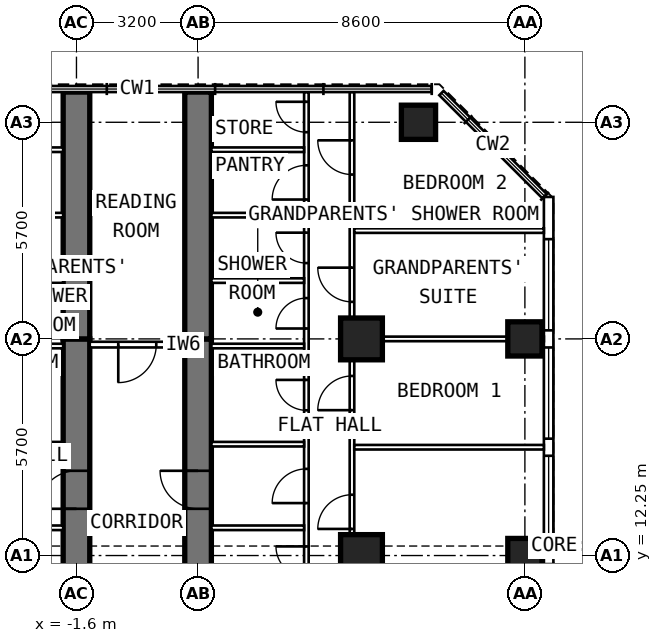
"""IFC4 building model, lengths in metres.
Left out: names, types, materials, properties, quantities, classifications, styles, units other than length and angle.
Written with IfcOpenShell. Run it as: python <this file> out.ifc"""

import sys

from ifc_helpers import new_model, si_unit, direction, frame, frame_2d, origin, origin_2d, place, context, subcontext, project, spatial, rectangle, extrude, element, fill, save


model = new_model("IFC4")
c1 = context("Model", 3, precision=1e-05, world=origin(), true_north=direction((0.0, 1.0)))
c2 = subcontext(c1, "Body", "Model", "MODEL_VIEW")
j1 = project(units=[si_unit("LENGTHUNIT", "METRE"), si_unit("PLANEANGLEUNIT", "RADIAN")], contexts=[c1])
p1 = place(None, origin())
s1 = spatial("IfcSite", under=j1, at=p1, CompositionType="ELEMENT")
p2 = place(p1, origin())
s2 = spatial("IfcBuilding", under=s1, at=p2, CompositionType="ELEMENT")
p3 = place(p2, frame((0.0, 0.0, 211.8)))
s3 = spatial("IfcBuildingStorey", under=s2, at=p3, CompositionType="ELEMENT", Elevation=211.8)
for number, where, z_axis, x_axis in (
    (1, (10.2, 12.25, 0.0), (0.0, 0.0, 1.0), (0.0, 1.0, 0.0)),
    (2, (10.2, 17.95, 0.0), (0.0, 0.0, 1.0), (0.0, 1.0, 0.0)),
    (3, (7.4, 23.65, 0.0), (0.0, 0.0, 1.0), (0.0, 1.0, 0.0)),
):
    element("IfcColumn", number, at=place(p3, frame(where, z_axis=z_axis, x_axis=x_axis)), inside=s3, PredefinedType="COLUMN", context=c2, shape_type="SweptSolid", body=[
        extrude(rectangle(XDim=0.9, YDim=0.9, at=origin_2d()), origin(), (0.0, 0.0, 1.0), 3.6),
    ])
for number, where, z_axis, x_axis in (
    (4, (5.9, 12.25, 0.0), (0.0, 0.0, 1.0), (0.0, 1.0, 0.0)),
    (5, (5.9, 17.95, 0.0), (0.0, 0.0, 1.0), (0.0, 1.0, 0.0)),
):
    element("IfcColumn", number, at=place(p3, frame(where, z_axis=z_axis, x_axis=x_axis)), inside=s3, PredefinedType="COLUMN", context=c2, shape_type="SweptSolid", body=[
        extrude(rectangle(XDim=1.1, YDim=1.1, at=origin_2d()), origin(), (0.0, 0.0, 1.0), 3.6),
    ])
p4 = place(p3, frame((-1.6, 9.6, 0.0), z_axis=(0.0, 0.0, 1.0), x_axis=(0.0, 1.0, 0.0)))
e6 = element("IfcWall", 6, at=p4, inside=s3, PredefinedType="SHEAR", context=c2, shape_type="SweptSolid", body=[
    extrude(rectangle(XDim=8.35, YDim=0.7, at=frame_2d((4.175, 0.0))), origin(), (0.0, 0.0, 1.0), 3.6),
])
p5 = place(p4, frame((3.88, 0.0, 0.0)))
e7 = element("IfcOpeningElement", 7, at=p5, cuts=e6, PredefinedType="OPENING", context=c2, shape_type="SweptSolid", body=[
    extrude(rectangle(XDim=1.0, YDim=2.1, at=frame_2d((0.5, 1.05))), frame((0.0, 0.362, 0.0), z_axis=(0.0, -1.0, 0.0), x_axis=(1.0, 0.0, 0.0)), (0.0, 0.0, 1.0), 0.724),
])
p6 = place(p3, frame((-1.6, 17.95, 0.0), z_axis=(0.0, 0.0, 1.0), x_axis=(0.0, 1.0, 0.0)))
e8 = element("IfcWall", 8, at=p6, inside=s3, PredefinedType="SHEAR", context=c2, shape_type="SweptSolid", body=[
    extrude(rectangle(XDim=6.495, YDim=0.7, at=frame_2d((3.248, 0.0))), origin(), (0.0, 0.0, 1.0), 3.6),
])
p7 = place(p3, frame((1.6, 9.6, 0.0), z_axis=(0.0, 0.0, 1.0), x_axis=(0.0, 1.0, 0.0)))
e9 = element("IfcWall", 9, at=p7, inside=s3, PredefinedType="SHEAR", context=c2, shape_type="SweptSolid", body=[
    extrude(rectangle(XDim=8.35, YDim=0.7, at=frame_2d((4.175, 0.0))), origin(), (0.0, 0.0, 1.0), 3.6),
])
p8 = place(p7, frame((3.88, 0.0, 0.0)))
e10 = element("IfcOpeningElement", 10, at=p8, cuts=e9, PredefinedType="OPENING", context=c2, shape_type="SweptSolid", body=[
    extrude(rectangle(XDim=1.0, YDim=2.1, at=frame_2d((0.5, 1.05))), frame((0.0, 0.362, 0.0), z_axis=(0.0, -1.0, 0.0), x_axis=(1.0, 0.0, 0.0)), (0.0, 0.0, 1.0), 0.724),
])
p9 = place(p3, frame((1.6, 17.95, 0.0), z_axis=(0.0, 0.0, 1.0), x_axis=(0.0, 1.0, 0.0)))
e11 = element("IfcWall", 11, at=p9, inside=s3, PredefinedType="SHEAR", context=c2, shape_type="SweptSolid", body=[
    extrude(rectangle(XDim=6.495, YDim=0.7, at=frame_2d((3.248, 0.0))), origin(), (0.0, 0.0, 1.0), 3.6),
])
p10 = place(p3, frame((10.825, 6.409, 0.0), z_axis=(0.0, 0.0, 1.0), x_axis=(0.0, 1.0, 0.0)))
e12 = element("IfcWall", 12, at=p10, inside=s3, PredefinedType="SOLIDWALL", context=c2, shape_type="SweptSolid", body=[
    extrude(rectangle(XDim=15.276, YDim=0.25, at=frame_2d((7.638, 0.0))), origin(), (0.0, 0.0, 1.0), 3.35),
])
p11 = place(p10, frame((0.366, 0.0, 0.8)))
e13 = element("IfcOpeningElement", 13, at=p11, cuts=e12, PredefinedType="OPENING", context=c2, shape_type="SweptSolid", body=[
    extrude(rectangle(XDim=2.4, YDim=1.8, at=frame_2d((1.2, 0.9))), frame((0.0, 0.137, 0.0), z_axis=(0.0, -1.0, 0.0), x_axis=(1.0, 0.0, 0.0)), (0.0, 0.0, 1.0), 0.274),
])
p12 = place(p10, frame((3.216, 0.0, 0.8)))
e14 = element("IfcOpeningElement", 14, at=p12, cuts=e12, PredefinedType="OPENING", context=c2, shape_type="SweptSolid", body=[
    extrude(rectangle(XDim=2.4, YDim=1.8, at=frame_2d((1.2, 0.9))), frame((0.0, 0.137, 0.0), z_axis=(0.0, -1.0, 0.0), x_axis=(1.0, 0.0, 0.0)), (0.0, 0.0, 1.0), 0.274),
])
p13 = place(p10, frame((6.066, 0.0, 0.8)))
e15 = element("IfcOpeningElement", 15, at=p13, cuts=e12, PredefinedType="OPENING", context=c2, shape_type="SweptSolid", body=[
    extrude(rectangle(XDim=2.4, YDim=1.8, at=frame_2d((1.2, 0.9))), frame((0.0, 0.137, 0.0), z_axis=(0.0, -1.0, 0.0), x_axis=(1.0, 0.0, 0.0)), (0.0, 0.0, 1.0), 0.274),
])
p14 = place(p10, frame((8.916, 0.0, 0.8)))
e16 = element("IfcOpeningElement", 16, at=p14, cuts=e12, PredefinedType="OPENING", context=c2, shape_type="SweptSolid", body=[
    extrude(rectangle(XDim=2.4, YDim=1.8, at=frame_2d((1.2, 0.9))), frame((0.0, 0.137, 0.0), z_axis=(0.0, -1.0, 0.0), x_axis=(1.0, 0.0, 0.0)), (0.0, 0.0, 1.0), 0.274),
])
p15 = place(p10, frame((11.766, 0.0, 0.8)))
e17 = element("IfcOpeningElement", 17, at=p15, cuts=e12, PredefinedType="OPENING", context=c2, shape_type="SweptSolid", body=[
    extrude(rectangle(XDim=2.4, YDim=1.8, at=frame_2d((1.2, 0.9))), frame((0.0, 0.137, 0.0), z_axis=(0.0, -1.0, 0.0), x_axis=(1.0, 0.0, 0.0)), (0.0, 0.0, 1.0), 0.274),
])
for number, where, z_axis, x_axis in (
    (18, (-1.95, 12.98, 0.0), (0.0, 0.0, 1.0), (-1.0, 0.0, 0.0)),
    (19, (-1.95, 15.18, 0.0), (0.0, 0.0, 1.0), (-1.0, 0.0, 0.0)),
):
    element("IfcWall", number, at=place(p3, frame(where, z_axis=z_axis, x_axis=x_axis)), inside=s3, PredefinedType="PARTITIONING", context=c2, shape_type="SweptSolid", body=[
        extrude(rectangle(XDim=2.44, YDim=0.12, at=frame_2d((1.22, 0.0))), origin(), (0.0, 0.0, 1.0), 3.35),
    ])
p16 = place(p3, frame((-1.95, 17.763, 0.0), z_axis=(0.0, 0.0, 1.0), x_axis=(-1.0, 0.0, 0.0)))
e20 = element("IfcWall", 20, at=p16, inside=s3, PredefinedType="PARTITIONING", context=c2, shape_type="SweptSolid", body=[
    extrude(rectangle(XDim=2.44, YDim=0.12, at=frame_2d((1.22, 0.0))), origin(), (0.0, 0.0, 1.0), 2.45),
])
for number, where, z_axis, x_axis in (
    (21, (-1.95, 19.485, 0.0), (0.0, 0.0, 1.0), (-1.0, 0.0, 0.0)),
    (22, (-1.95, 21.206, 0.0), (0.0, 0.0, 1.0), (-1.0, 0.0, 0.0)),
    (23, (-1.95, 22.928, 0.0), (0.0, 0.0, 1.0), (-1.0, 0.0, 0.0)),
):
    element("IfcWall", number, at=place(p3, frame(where, z_axis=z_axis, x_axis=x_axis)), inside=s3, PredefinedType="PARTITIONING", context=c2, shape_type="SweptSolid", body=[
        extrude(rectangle(XDim=2.44, YDim=0.12, at=frame_2d((1.22, 0.0))), origin(), (0.0, 0.0, 1.0), 3.35),
    ])
p17 = place(p3, frame((4.45, 9.925, 0.0), z_axis=(0.0, 0.0, 1.0), x_axis=(0.0, 1.0, 0.0)))
e24 = element("IfcWall", 24, at=p17, inside=s3, PredefinedType="PARTITIONING", context=c2, shape_type="SweptSolid", body=[
    extrude(rectangle(XDim=14.52, YDim=0.12, at=frame_2d((7.26, 0.0))), origin(), (0.0, 0.0, 1.0), 3.35),
])
p18 = place(p17, frame((1.765, 0.0, 0.0)))
e25 = element("IfcOpeningElement", 25, at=p18, cuts=e24, PredefinedType="OPENING", context=c2, shape_type="SweptSolid", body=[
    extrude(rectangle(XDim=0.8, YDim=2.1, at=frame_2d((0.4, 1.05))), frame((0.0, 0.072, 0.0), z_axis=(0.0, -1.0, 0.0), x_axis=(1.0, 0.0, 0.0)), (0.0, 0.0, 1.0), 0.144),
])
p19 = place(p17, frame((3.705, 0.0, 0.0)))
e26 = element("IfcOpeningElement", 26, at=p19, cuts=e24, PredefinedType="OPENING", context=c2, shape_type="SweptSolid", body=[
    extrude(rectangle(XDim=0.9, YDim=2.1, at=frame_2d((0.45, 1.05))), frame((0.0, 0.072, 0.0), z_axis=(0.0, -1.0, 0.0), x_axis=(1.0, 0.0, 0.0)), (0.0, 0.0, 1.0), 0.144),
])
p20 = place(p17, frame((6.146, 0.0, 0.0)))
e27 = element("IfcOpeningElement", 27, at=p20, cuts=e24, PredefinedType="OPENING", context=c2, shape_type="SweptSolid", body=[
    extrude(rectangle(XDim=0.8, YDim=2.1, at=frame_2d((0.4, 1.05))), frame((0.0, 0.072, 0.0), z_axis=(0.0, -1.0, 0.0), x_axis=(1.0, 0.0, 0.0)), (0.0, 0.0, 1.0), 0.144),
])
p21 = place(p17, frame((8.299, 0.0, 0.0)))
e28 = element("IfcOpeningElement", 28, at=p21, cuts=e24, PredefinedType="OPENING", context=c2, shape_type="SweptSolid", body=[
    extrude(rectangle(XDim=0.8, YDim=2.1, at=frame_2d((0.4, 1.05))), frame((0.0, 0.072, 0.0), z_axis=(0.0, -1.0, 0.0), x_axis=(1.0, 0.0, 0.0)), (0.0, 0.0, 1.0), 0.144),
])
p22 = place(p17, frame((10.021, 0.0, 0.0)))
e29 = element("IfcOpeningElement", 29, at=p22, cuts=e24, PredefinedType="OPENING", context=c2, shape_type="SweptSolid", body=[
    extrude(rectangle(XDim=0.8, YDim=2.1, at=frame_2d((0.4, 1.05))), frame((0.0, 0.072, 0.0), z_axis=(0.0, -1.0, 0.0), x_axis=(1.0, 0.0, 0.0)), (0.0, 0.0, 1.0), 0.144),
])
p23 = place(p17, frame((11.692, 0.0, 0.0)))
e30 = element("IfcOpeningElement", 30, at=p23, cuts=e24, PredefinedType="OPENING", context=c2, shape_type="SweptSolid", body=[
    extrude(rectangle(XDim=0.9, YDim=2.1, at=frame_2d((0.45, 1.05))), frame((0.0, 0.072, 0.0), z_axis=(0.0, -1.0, 0.0), x_axis=(1.0, 0.0, 0.0)), (0.0, 0.0, 1.0), 0.144),
])
p24 = place(p17, frame((13.464, 0.0, 0.0)))
e31 = element("IfcOpeningElement", 31, at=p24, cuts=e24, PredefinedType="OPENING", context=c2, shape_type="SweptSolid", body=[
    extrude(rectangle(XDim=0.8, YDim=2.1, at=frame_2d((0.4, 1.05))), frame((0.0, 0.072, 0.0), z_axis=(0.0, -1.0, 0.0), x_axis=(1.0, 0.0, 0.0)), (0.0, 0.0, 1.0), 0.144),
])
p25 = place(p3, frame((5.65, 9.6, 0.0), z_axis=(0.0, 0.0, 1.0), x_axis=(0.0, 1.0, 0.0)))
e32 = element("IfcWall", 32, at=p25, inside=s3, PredefinedType="PARTITIONING", context=c2, shape_type="SweptSolid", body=[
    extrude(rectangle(XDim=14.845, YDim=0.12, at=frame_2d((7.422, 0.0))), origin(), (0.0, 0.0, 1.0), 3.35),
])
p26 = place(p25, frame((3.35, 0.0, 0.0)))
e33 = element("IfcOpeningElement", 33, at=p26, cuts=e32, PredefinedType="OPENING", context=c2, shape_type="SweptSolid", body=[
    extrude(rectangle(XDim=0.9, YDim=2.1, at=frame_2d((0.45, 1.05))), frame((0.0, 0.072, 0.0), z_axis=(0.0, -1.0, 0.0), x_axis=(1.0, 0.0, 0.0)), (0.0, 0.0, 1.0), 0.144),
])
p27 = place(p25, frame((6.475, 0.0, 0.0)))
e34 = element("IfcOpeningElement", 34, at=p27, cuts=e32, PredefinedType="OPENING", context=c2, shape_type="SweptSolid", body=[
    extrude(rectangle(XDim=0.9, YDim=2.1, at=frame_2d((0.45, 1.05))), frame((0.0, 0.072, 0.0), z_axis=(0.0, -1.0, 0.0), x_axis=(1.0, 0.0, 0.0)), (0.0, 0.0, 1.0), 0.144),
])
p28 = place(p25, frame((9.325, 0.0, 0.0)))
e35 = element("IfcOpeningElement", 35, at=p28, cuts=e32, PredefinedType="OPENING", context=c2, shape_type="SweptSolid", body=[
    extrude(rectangle(XDim=0.9, YDim=2.1, at=frame_2d((0.45, 1.05))), frame((0.0, 0.072, 0.0), z_axis=(0.0, -1.0, 0.0), x_axis=(1.0, 0.0, 0.0)), (0.0, 0.0, 1.0), 0.144),
])
p29 = place(p25, frame((12.675, 0.0, 0.0)))
e36 = element("IfcOpeningElement", 36, at=p29, cuts=e32, PredefinedType="OPENING", context=c2, shape_type="SweptSolid", body=[
    extrude(rectangle(XDim=0.9, YDim=2.1, at=frame_2d((0.45, 1.05))), frame((0.0, 0.072, 0.0), z_axis=(0.0, -1.0, 0.0), x_axis=(1.0, 0.0, 0.0)), (0.0, 0.0, 1.0), 0.144),
])
p30 = place(p3, frame((5.71, 15.1, 0.0), z_axis=(0.0, 0.0, 1.0), x_axis=(1.0, 0.0, 0.0)))
e37 = element("IfcWall", 37, at=p30, inside=s3, PredefinedType="PARTITIONING", context=c2, shape_type="SweptSolid", body=[
    extrude(rectangle(XDim=4.99, YDim=0.12, at=frame_2d((2.495, 0.0))), origin(), (0.0, 0.0, 1.0), 3.35),
])
p31 = place(p3, frame((5.71, 17.95, 0.0), z_axis=(0.0, 0.0, 1.0), x_axis=(1.0, 0.0, 0.0)))
e38 = element("IfcWall", 38, at=p31, inside=s3, PredefinedType="PARTITIONING", context=c2, shape_type="SweptSolid", body=[
    extrude(rectangle(XDim=4.99, YDim=0.12, at=frame_2d((2.495, 0.0))), origin(), (0.0, 0.0, 1.0), 2.45),
])
p32 = place(p3, frame((5.71, 20.8, 0.0), z_axis=(0.0, 0.0, 1.0), x_axis=(1.0, 0.0, 0.0)))
e39 = element("IfcWall", 39, at=p32, inside=s3, PredefinedType="PARTITIONING", context=c2, shape_type="SweptSolid", body=[
    extrude(rectangle(XDim=4.99, YDim=0.12, at=frame_2d((2.495, 0.0))), origin(), (0.0, 0.0, 1.0), 3.35),
])
for number, where, z_axis, x_axis in (
    (40, (1.95, 12.98, 0.0), (0.0, 0.0, 1.0), (1.0, 0.0, 0.0)),
    (41, (1.95, 15.18, 0.0), (0.0, 0.0, 1.0), (1.0, 0.0, 0.0)),
):
    element("IfcWall", number, at=place(p3, frame(where, z_axis=z_axis, x_axis=x_axis)), inside=s3, PredefinedType="PARTITIONING", context=c2, shape_type="SweptSolid", body=[
        extrude(rectangle(XDim=2.44, YDim=0.12, at=frame_2d((1.22, 0.0))), origin(), (0.0, 0.0, 1.0), 3.35),
    ])
p33 = place(p3, frame((1.95, 17.763, 0.0), z_axis=(0.0, 0.0, 1.0), x_axis=(1.0, 0.0, 0.0)))
e42 = element("IfcWall", 42, at=p33, inside=s3, PredefinedType="PARTITIONING", context=c2, shape_type="SweptSolid", body=[
    extrude(rectangle(XDim=2.44, YDim=0.12, at=frame_2d((1.22, 0.0))), origin(), (0.0, 0.0, 1.0), 2.45),
])
for number, where, z_axis, x_axis in (
    (43, (1.95, 19.485, 0.0), (0.0, 0.0, 1.0), (1.0, 0.0, 0.0)),
    (44, (1.95, 21.206, 0.0), (0.0, 0.0, 1.0), (1.0, 0.0, 0.0)),
    (45, (1.95, 22.928, 0.0), (0.0, 0.0, 1.0), (1.0, 0.0, 0.0)),
):
    element("IfcWall", number, at=place(p3, frame(where, z_axis=z_axis, x_axis=x_axis)), inside=s3, PredefinedType="PARTITIONING", context=c2, shape_type="SweptSolid", body=[
        extrude(rectangle(XDim=2.44, YDim=0.12, at=frame_2d((1.22, 0.0))), origin(), (0.0, 0.0, 1.0), 3.35),
    ])
p34 = place(p3, frame((1.25, 17.8, 0.0), z_axis=(0.0, 0.0, 1.0), x_axis=(-1.0, 0.0, 0.0)))
e46 = element("IfcWall", 46, at=p34, inside=s3, PredefinedType="PARTITIONING", context=c2, shape_type="SweptSolid", body=[
    extrude(rectangle(XDim=2.5, YDim=0.15, at=frame_2d((1.25, 0.0))), origin(), (0.0, 0.0, 1.0), 3.35),
])
p35 = place(p34, frame((0.75, 0.0, 0.0)))
e47 = element("IfcOpeningElement", 47, at=p35, cuts=e46, PredefinedType="OPENING", context=c2, shape_type="SweptSolid", body=[
    extrude(rectangle(XDim=1.0, YDim=2.1, at=frame_2d((0.5, 1.05))), frame((0.0, 0.087, 0.0), z_axis=(0.0, -1.0, 0.0), x_axis=(1.0, 0.0, 0.0)), (0.0, 0.0, 1.0), 0.174),
])
p36 = place(p13, origin())
e48 = element("IfcWindow", 48, at=p36, inside=s3, PartitioningType="SINGLE_PANEL", PredefinedType="WINDOW", context=c2, shape_type="SweptSolid", body=[
    extrude(rectangle(XDim=2.4, YDim=1.8, at=frame_2d((1.2, 0.9))), frame((0.0, 0.03, 0.0), z_axis=(0.0, -1.0, 0.0), x_axis=(1.0, 0.0, 0.0)), (0.0, 0.0, 1.0), 0.06),
])
fill(e15, e48)
p37 = place(p14, origin())
e49 = element("IfcWindow", 49, at=p37, inside=s3, PartitioningType="SINGLE_PANEL", PredefinedType="WINDOW", context=c2, shape_type="SweptSolid", body=[
    extrude(rectangle(XDim=2.4, YDim=1.8, at=frame_2d((1.2, 0.9))), frame((0.0, 0.03, 0.0), z_axis=(0.0, -1.0, 0.0), x_axis=(1.0, 0.0, 0.0)), (0.0, 0.0, 1.0), 0.06),
])
fill(e16, e49)
p38 = place(p15, origin())
e50 = element("IfcWindow", 50, at=p38, inside=s3, PartitioningType="SINGLE_PANEL", PredefinedType="WINDOW", context=c2, shape_type="SweptSolid", body=[
    extrude(rectangle(XDim=2.4, YDim=1.8, at=frame_2d((1.2, 0.9))), frame((0.0, 0.03, 0.0), z_axis=(0.0, -1.0, 0.0), x_axis=(1.0, 0.0, 0.0)), (0.0, 0.0, 1.0), 0.06),
])
fill(e17, e50)
p39 = place(p5, origin())
e51 = element("IfcDoor", 51, at=p39, inside=s3, OperationType="SINGLE_SWING_LEFT", PredefinedType="DOOR", context=c2, shape_type="SweptSolid", body=[
    extrude(rectangle(XDim=1.0, YDim=2.1, at=frame_2d((0.5, 1.05))), frame((0.0, 0.1, 0.0), z_axis=(0.0, -1.0, 0.0), x_axis=(1.0, 0.0, 0.0)), (0.0, 0.0, 1.0), 0.2),
])
fill(e7, e51)
p40 = place(p8, origin())
e52 = element("IfcDoor", 52, at=p40, inside=s3, OperationType="SINGLE_SWING_RIGHT", PredefinedType="DOOR", context=c2, shape_type="SweptSolid", body=[
    extrude(rectangle(XDim=1.0, YDim=2.1, at=frame_2d((0.5, 1.05))), frame((0.0, 0.1, 0.0), z_axis=(0.0, -1.0, 0.0), x_axis=(1.0, 0.0, 0.0)), (0.0, 0.0, 1.0), 0.2),
])
fill(e10, e52)
p41 = place(p26, origin())
e53 = element("IfcDoor", 53, at=p41, inside=s3, OperationType="SINGLE_SWING_LEFT", PredefinedType="DOOR", context=c2, shape_type="SweptSolid", body=[
    extrude(rectangle(XDim=0.9, YDim=2.1, at=frame_2d((0.45, 1.05))), frame((0.0, 0.025, 0.0), z_axis=(0.0, -1.0, 0.0), x_axis=(1.0, 0.0, 0.0)), (0.0, 0.0, 1.0), 0.05),
])
fill(e33, e53)
p42 = place(p27, origin())
e54 = element("IfcDoor", 54, at=p42, inside=s3, OperationType="SINGLE_SWING_LEFT", PredefinedType="DOOR", context=c2, shape_type="SweptSolid", body=[
    extrude(rectangle(XDim=0.9, YDim=2.1, at=frame_2d((0.45, 1.05))), frame((0.0, 0.025, 0.0), z_axis=(0.0, -1.0, 0.0), x_axis=(1.0, 0.0, 0.0)), (0.0, 0.0, 1.0), 0.05),
])
fill(e34, e54)
p43 = place(p28, origin())
e55 = element("IfcDoor", 55, at=p43, inside=s3, OperationType="SINGLE_SWING_RIGHT", PredefinedType="DOOR", context=c2, shape_type="SweptSolid", body=[
    extrude(rectangle(XDim=0.9, YDim=2.1, at=frame_2d((0.45, 1.05))), frame((0.0, 0.025, 0.0), z_axis=(0.0, -1.0, 0.0), x_axis=(1.0, 0.0, 0.0)), (0.0, 0.0, 1.0), 0.05),
])
fill(e35, e55)
p44 = place(p29, origin())
e56 = element("IfcDoor", 56, at=p44, inside=s3, OperationType="SINGLE_SWING_RIGHT", PredefinedType="DOOR", context=c2, shape_type="SweptSolid", body=[
    extrude(rectangle(XDim=0.9, YDim=2.1, at=frame_2d((0.45, 1.05))), frame((0.0, 0.025, 0.0), z_axis=(0.0, -1.0, 0.0), x_axis=(1.0, 0.0, 0.0)), (0.0, 0.0, 1.0), 0.05),
])
fill(e36, e56)
p45 = place(p18, origin())
e57 = element("IfcDoor", 57, at=p45, inside=s3, OperationType="SINGLE_SWING_RIGHT", PredefinedType="DOOR", context=c2, shape_type="SweptSolid", body=[
    extrude(rectangle(XDim=0.8, YDim=2.1, at=frame_2d((0.4, 1.05))), frame((0.0, 0.025, 0.0), z_axis=(0.0, -1.0, 0.0), x_axis=(1.0, 0.0, 0.0)), (0.0, 0.0, 1.0), 0.05),
])
fill(e25, e57)
p46 = place(p19, origin())
e58 = element("IfcDoor", 58, at=p46, inside=s3, OperationType="SINGLE_SWING_LEFT", PredefinedType="DOOR", context=c2, shape_type="SweptSolid", body=[
    extrude(rectangle(XDim=0.9, YDim=2.1, at=frame_2d((0.45, 1.05))), frame((0.0, 0.025, 0.0), z_axis=(0.0, -1.0, 0.0), x_axis=(1.0, 0.0, 0.0)), (0.0, 0.0, 1.0), 0.05),
])
fill(e26, e58)
p47 = place(p20, origin())
e59 = element("IfcDoor", 59, at=p47, inside=s3, OperationType="SINGLE_SWING_RIGHT", PredefinedType="DOOR", context=c2, shape_type="SweptSolid", body=[
    extrude(rectangle(XDim=0.8, YDim=2.1, at=frame_2d((0.4, 1.05))), frame((0.0, 0.025, 0.0), z_axis=(0.0, -1.0, 0.0), x_axis=(1.0, 0.0, 0.0)), (0.0, 0.0, 1.0), 0.05),
])
fill(e27, e59)
p48 = place(p21, origin())
e60 = element("IfcDoor", 60, at=p48, inside=s3, OperationType="SINGLE_SWING_LEFT", PredefinedType="DOOR", context=c2, shape_type="SweptSolid", body=[
    extrude(rectangle(XDim=0.8, YDim=2.1, at=frame_2d((0.4, 1.05))), frame((0.0, 0.025, 0.0), z_axis=(0.0, -1.0, 0.0), x_axis=(1.0, 0.0, 0.0)), (0.0, 0.0, 1.0), 0.05),
])
fill(e28, e60)
p49 = place(p22, origin())
e61 = element("IfcDoor", 61, at=p49, inside=s3, OperationType="SINGLE_SWING_RIGHT", PredefinedType="DOOR", context=c2, shape_type="SweptSolid", body=[
    extrude(rectangle(XDim=0.8, YDim=2.1, at=frame_2d((0.4, 1.05))), frame((0.0, 0.025, 0.0), z_axis=(0.0, -1.0, 0.0), x_axis=(1.0, 0.0, 0.0)), (0.0, 0.0, 1.0), 0.05),
])
fill(e29, e61)
p50 = place(p23, origin())
e62 = element("IfcDoor", 62, at=p50, inside=s3, OperationType="SINGLE_SWING_LEFT", PredefinedType="DOOR", context=c2, shape_type="SweptSolid", body=[
    extrude(rectangle(XDim=0.9, YDim=2.1, at=frame_2d((0.45, 1.05))), frame((0.0, 0.025, 0.0), z_axis=(0.0, -1.0, 0.0), x_axis=(1.0, 0.0, 0.0)), (0.0, 0.0, 1.0), 0.05),
])
fill(e30, e62)
p51 = place(p24, origin())
e63 = element("IfcDoor", 63, at=p51, inside=s3, OperationType="SINGLE_SWING_RIGHT", PredefinedType="DOOR", context=c2, shape_type="SweptSolid", body=[
    extrude(rectangle(XDim=0.8, YDim=2.1, at=frame_2d((0.4, 1.05))), frame((0.0, 0.025, 0.0), z_axis=(0.0, -1.0, 0.0), x_axis=(1.0, 0.0, 0.0)), (0.0, 0.0, 1.0), 0.05),
])
fill(e31, e63)
p52 = place(p35, origin())
e64 = element("IfcDoor", 64, at=p52, inside=s3, OperationType="SINGLE_SWING_RIGHT", PredefinedType="DOOR", context=c2, shape_type="SweptSolid", body=[
    extrude(rectangle(XDim=1.0, YDim=2.1, at=frame_2d((0.5, 1.05))), frame((0.0, 0.025, 0.0), z_axis=(0.0, -1.0, 0.0), x_axis=(1.0, 0.0, 0.0)), (0.0, 0.0, 1.0), 0.05),
])
fill(e47, e64)
save(model, sys.argv[1])
